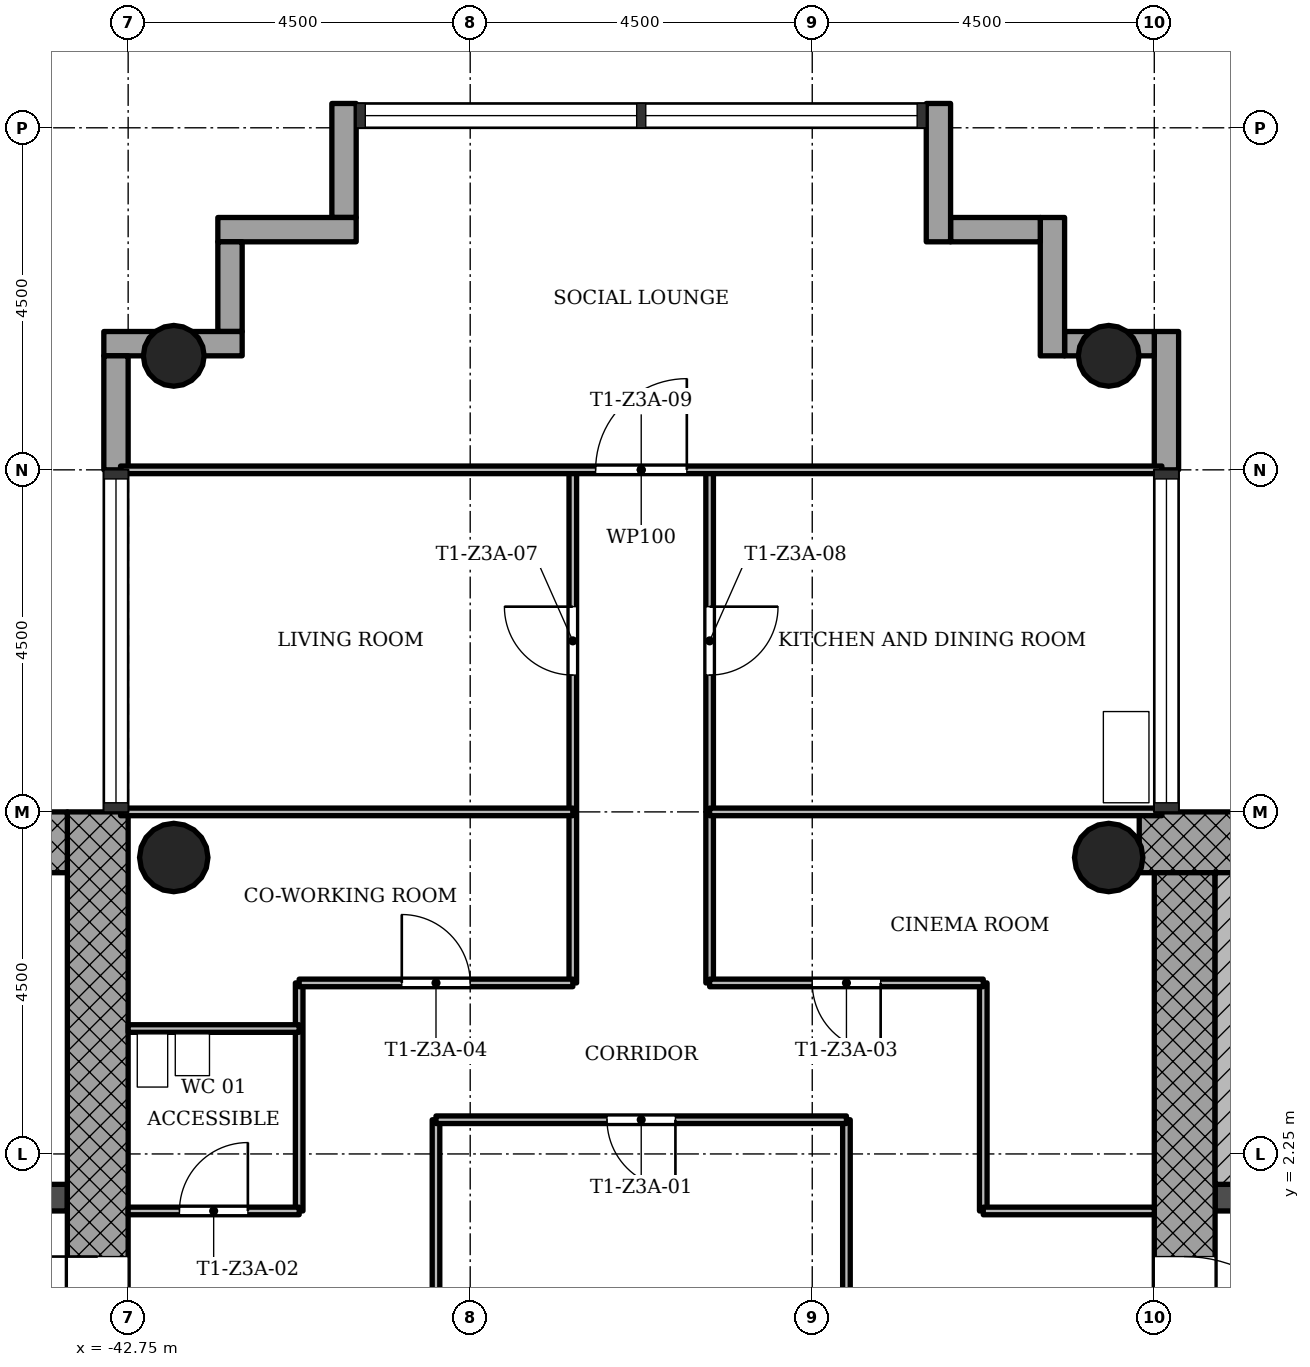
"""IFC4 building model, lengths in metres.
Left out: names, types, materials, properties, quantities, classifications, styles, units other than length and angle.
Written with IfcOpenShell. Run it as: python <this file> out.ifc"""

import sys

from ifc_helpers import new_model, si_unit, direction, frame, frame_2d, origin, origin_2d, place, context, subcontext, project, spatial, rectangle, hollow_circle, extrude, element, fill, save


model = new_model("IFC4")
c1 = context("Model", 3, precision=1e-05, world=origin(), true_north=direction((0.0, 1.0)))
c2 = subcontext(c1, "Body", "Model", "MODEL_VIEW")
j1 = project(units=[si_unit("LENGTHUNIT", "METRE"), si_unit("PLANEANGLEUNIT", "RADIAN")], contexts=[c1])
p1 = place(None, origin())
s1 = spatial("IfcSite", under=j1, at=p1, CompositionType="ELEMENT")
p2 = place(p1, origin())
s2 = spatial("IfcBuilding", under=s1, at=p2, CompositionType="ELEMENT")
p3 = place(p2, frame((0.0, 0.0, 133.7)))
s3 = spatial("IfcBuildingStorey", under=s2, at=p3, CompositionType="ELEMENT", Elevation=133.7)
p4 = place(p3, frame((-20.652, 6.35, 0.0), z_axis=(0.0, 0.0, 1.0), x_axis=(-1.0, 0.0, 0.0)))
e1 = element("IfcWall", 1, at=p4, inside=s3, PredefinedType="SHEAR", context=c2, shape_type="SweptSolid", body=[
    extrude(rectangle(XDim=8.796, YDim=0.8, at=frame_2d((4.398, 0.0))), origin(), (0.0, 0.0, 1.0), 3.4),
])
p5 = place(p3, frame((-28.85, 5.95, 0.0), z_axis=(0.0, 0.0, 1.0), x_axis=(0.0, -1.0, 0.0)))
e2 = element("IfcWall", 2, at=p5, inside=s3, PredefinedType="SHEAR", context=c2, shape_type="SweptSolid", body=[
    extrude(rectangle(XDim=12.7, YDim=0.8, at=frame_2d((6.35, 0.0))), origin(), (0.0, 0.0, 1.0), 3.4),
])
p6 = place(p5, frame((5.05, 0.0, 0.0)))
e3 = element("IfcOpeningElement", 3, at=p6, cuts=e2, PredefinedType="OPENING", context=c2, shape_type="SweptSolid", body=[
    extrude(rectangle(XDim=1.8, YDim=2.1, at=frame_2d((0.9, 1.05))), frame((0.0, 0.41, 0.0), z_axis=(0.0, -1.0, 0.0), x_axis=(1.0, 0.0, 0.0)), (0.0, 0.0, 1.0), 0.82),
])
p7 = place(p3, frame((-28.45, 1.675, 0.0), z_axis=(0.0, 0.0, 1.0), x_axis=(1.0, 0.0, 0.0)))
e4 = element("IfcWall", 4, at=p7, inside=s3, PredefinedType="SHEAR", context=c2, shape_type="SweptSolid", body=[
    extrude(rectangle(XDim=7.4, YDim=0.35, at=frame_2d((3.7, 0.0))), origin(), (0.0, 0.0, 1.0), 3.4),
])
p8 = place(p7, frame((0.85, 0.0, 0.0)))
e5 = element("IfcOpeningElement", 5, at=p8, cuts=e4, PredefinedType="OPENING", context=c2, shape_type="SweptSolid", body=[
    extrude(rectangle(XDim=0.9, YDim=2.1, at=frame_2d((0.45, 1.05))), frame((0.0, 0.185, 0.0), z_axis=(0.0, -1.0, 0.0), x_axis=(1.0, 0.0, 0.0)), (0.0, 0.0, 1.0), 0.37),
])
p9 = place(p3, frame((-43.15, -5.95, 0.0), z_axis=(0.0, 0.0, 1.0), x_axis=(0.0, 1.0, 0.0)))
e6 = element("IfcWall", 6, at=p9, inside=s3, PredefinedType="SHEAR", context=c2, shape_type="SweptSolid", body=[
    extrude(rectangle(XDim=12.7, YDim=0.8, at=frame_2d((6.35, 0.0))), origin(), (0.0, 0.0, 1.0), 3.4),
])
p10 = place(p9, frame((5.05, 0.0, 0.0)))
e7 = element("IfcOpeningElement", 7, at=p10, cuts=e6, PredefinedType="OPENING", context=c2, shape_type="SweptSolid", body=[
    extrude(rectangle(XDim=1.8, YDim=2.1, at=frame_2d((0.9, 1.05))), frame((0.0, 0.41, 0.0), z_axis=(0.0, -1.0, 0.0), x_axis=(1.0, 0.0, 0.0)), (0.0, 0.0, 1.0), 0.82),
])
p11 = place(p3, frame((-43.55, 6.35, 0.0), z_axis=(0.0, 0.0, 1.0), x_axis=(-1.0, 0.0, 0.0)))
e8 = element("IfcWall", 8, at=p11, inside=s3, PredefinedType="SHEAR", context=c2, shape_type="SweptSolid", body=[
    extrude(rectangle(XDim=8.2, YDim=0.8, at=frame_2d((4.1, 0.0))), origin(), (0.0, 0.0, 1.0), 3.4),
])
p12 = place(p3, frame((-50.95, 1.675, 0.0), z_axis=(0.0, 0.0, 1.0), x_axis=(1.0, 0.0, 0.0)))
e9 = element("IfcWall", 9, at=p12, inside=s3, PredefinedType="SHEAR", context=c2, shape_type="SweptSolid", body=[
    extrude(rectangle(XDim=7.4, YDim=0.35, at=frame_2d((3.7, 0.0))), origin(), (0.0, 0.0, 1.0), 3.4),
])
p13 = place(p12, frame((5.35, 0.0, 0.0)))
e10 = element("IfcOpeningElement", 10, at=p13, cuts=e9, PredefinedType="OPENING", context=c2, shape_type="SweptSolid", body=[
    extrude(rectangle(XDim=1.1, YDim=2.1, at=frame_2d((0.55, 1.05))), frame((0.0, 0.185, 0.0), z_axis=(0.0, -1.0, 0.0), x_axis=(1.0, 0.0, 0.0)), (0.0, 0.0, 1.0), 0.37),
])
p14 = place(p12, frame((1.0, 0.0, 0.0)))
e11 = element("IfcOpeningElement", 11, at=p14, cuts=e9, PredefinedType="OPENING", context=c2, shape_type="SweptSolid", body=[
    extrude(rectangle(XDim=1.1, YDim=2.1, at=frame_2d((0.55, 1.05))), frame((0.0, 0.185, 0.0), z_axis=(0.0, -1.0, 0.0), x_axis=(1.0, 0.0, 0.0)), (0.0, 0.0, 1.0), 0.37),
])
for number, where, z_axis, x_axis in (
    (12, (-29.85, 12.75, 0.0), (0.0, 0.0, 1.0), (1.0, 0.0, 0.0)),
    (13, (-42.15, 12.75, 0.0), (0.0, 0.0, 1.0), (1.0, 0.0, 0.0)),
):
    element("IfcColumn", number, at=place(p3, frame(where, z_axis=z_axis, x_axis=x_axis)), inside=s3, PredefinedType="COLUMN", context=c2, shape_type="SweptSolid", body=[
        extrude(hollow_circle(Radius=0.4, WallThickness=0.028, at=origin_2d()), origin(), (0.0, 0.0, 1.0), 3.4),
    ])
for number, where, z_axis, x_axis in (
    (14, (-29.85, 6.15, 0.0), (0.0, 0.0, 1.0), (1.0, 0.0, 0.0)),
    (15, (-42.15, 6.15, 0.0), (0.0, 0.0, 1.0), (1.0, 0.0, 0.0)),
):
    element("IfcColumn", number, at=place(p3, frame(where, z_axis=z_axis, x_axis=x_axis)), inside=s3, PredefinedType="COLUMN", context=c2, shape_type="SweptSolid", body=[
        extrude(hollow_circle(Radius=0.45, WallThickness=0.032, at=origin_2d()), origin(), (0.0, 0.0, 1.0), 3.4),
    ])
p15 = place(p3, frame((-29.09, 11.25, -0.3), z_axis=(0.0, 0.0, 1.0), x_axis=(0.0, 1.0, 0.0)))
e16 = element("IfcWall", 16, at=p15, inside=s3, PredefinedType="STANDARD", context=c2, shape_type="SweptSolid", body=[
    extrude(rectangle(XDim=1.82, YDim=0.32, at=frame_2d((0.91, 0.0))), origin(), (0.0, 0.0, 1.0), 3.4),
])
p16 = place(p3, frame((-29.25, 12.91, -0.3), z_axis=(0.0, 0.0, 1.0), x_axis=(-1.0, 0.0, 0.0)))
e17 = element("IfcWall", 17, at=p16, inside=s3, PredefinedType="STANDARD", context=c2, shape_type="SweptSolid", body=[
    extrude(rectangle(XDim=1.18, YDim=0.32, at=frame_2d((0.59, 0.0))), origin(), (0.0, 0.0, 1.0), 3.4),
])
p17 = place(p3, frame((-30.59, 12.75, -0.3), z_axis=(0.0, 0.0, 1.0), x_axis=(0.0, 1.0, 0.0)))
e18 = element("IfcWall", 18, at=p17, inside=s3, PredefinedType="STANDARD", context=c2, shape_type="SweptSolid", body=[
    extrude(rectangle(XDim=1.82, YDim=0.32, at=frame_2d((0.91, 0.0))), origin(), (0.0, 0.0, 1.0), 3.4),
])
p18 = place(p3, frame((-30.75, 14.41, -0.3), z_axis=(0.0, 0.0, 1.0), x_axis=(-1.0, 0.0, 0.0)))
e19 = element("IfcWall", 19, at=p18, inside=s3, PredefinedType="STANDARD", context=c2, shape_type="SweptSolid", body=[
    extrude(rectangle(XDim=1.18, YDim=0.32, at=frame_2d((0.59, 0.0))), origin(), (0.0, 0.0, 1.0), 3.4),
])
p19 = place(p3, frame((-32.09, 14.25, -0.3), z_axis=(0.0, 0.0, 1.0), x_axis=(0.0, 1.0, 0.0)))
e20 = element("IfcWall", 20, at=p19, inside=s3, PredefinedType="STANDARD", context=c2, shape_type="SweptSolid", body=[
    extrude(rectangle(XDim=1.82, YDim=0.32, at=frame_2d((0.91, 0.0))), origin(), (0.0, 0.0, 1.0), 3.4),
])
p20 = place(p3, frame((-39.91, 16.07, -0.3), z_axis=(0.0, 0.0, 1.0), x_axis=(0.0, -1.0, 0.0)))
e21 = element("IfcWall", 21, at=p20, inside=s3, PredefinedType="STANDARD", context=c2, shape_type="SweptSolid", body=[
    extrude(rectangle(XDim=1.5, YDim=0.32, at=frame_2d((0.75, 0.0))), origin(), (0.0, 0.0, 1.0), 3.4),
])
p21 = place(p3, frame((-39.75, 14.41, -0.3), z_axis=(0.0, 0.0, 1.0), x_axis=(-1.0, 0.0, 0.0)))
e22 = element("IfcWall", 22, at=p21, inside=s3, PredefinedType="STANDARD", context=c2, shape_type="SweptSolid", body=[
    extrude(rectangle(XDim=1.82, YDim=0.32, at=frame_2d((0.91, 0.0))), origin(), (0.0, 0.0, 1.0), 3.4),
])
p22 = place(p3, frame((-41.41, 14.25, -0.3), z_axis=(0.0, 0.0, 1.0), x_axis=(0.0, -1.0, 0.0)))
e23 = element("IfcWall", 23, at=p22, inside=s3, PredefinedType="STANDARD", context=c2, shape_type="SweptSolid", body=[
    extrude(rectangle(XDim=1.18, YDim=0.32, at=frame_2d((0.59, 0.0))), origin(), (0.0, 0.0, 1.0), 3.4),
])
p23 = place(p3, frame((-41.25, 12.91, -0.3), z_axis=(0.0, 0.0, 1.0), x_axis=(-1.0, 0.0, 0.0)))
e24 = element("IfcWall", 24, at=p23, inside=s3, PredefinedType="STANDARD", context=c2, shape_type="SweptSolid", body=[
    extrude(rectangle(XDim=1.82, YDim=0.32, at=frame_2d((0.91, 0.0))), origin(), (0.0, 0.0, 1.0), 3.4),
])
p24 = place(p3, frame((-42.91, 12.75, -0.3), z_axis=(0.0, 0.0, 1.0), x_axis=(0.0, -1.0, 0.0)))
e25 = element("IfcWall", 25, at=p24, inside=s3, PredefinedType="STANDARD", context=c2, shape_type="SweptSolid", body=[
    extrude(rectangle(XDim=1.5, YDim=0.32, at=frame_2d((0.75, 0.0))), origin(), (0.0, 0.0, 1.0), 3.4),
])
p25 = place(p3, frame((-40.5, 1.5, 0.0), z_axis=(0.0, 0.0, 1.0), x_axis=(0.0, 1.0, 0.0)))
e26 = element("IfcWall", 26, at=p25, inside=s3, PredefinedType="PARTITIONING", context=c2, shape_type="SweptSolid", body=[
    extrude(rectangle(XDim=3.0, YDim=0.1, at=frame_2d((1.5, 0.0))), origin(), (0.0, 0.0, 1.0), 3.0),
])
p26 = place(p3, frame((-38.7, -2.7, 0.0), z_axis=(0.0, 0.0, 1.0), x_axis=(0.0, 1.0, 0.0)))
e27 = element("IfcWall", 27, at=p26, inside=s3, PredefinedType="PARTITIONING", context=c2, shape_type="SweptSolid", body=[
    extrude(rectangle(XDim=5.4, YDim=0.1, at=frame_2d((2.7, 0.0))), origin(), (0.0, 0.0, 1.0), 3.0),
])
p27 = place(p3, frame((-36.9, 4.5, 0.0), z_axis=(0.0, 0.0, 1.0), x_axis=(0.0, 1.0, 0.0)))
e28 = element("IfcWall", 28, at=p27, inside=s3, PredefinedType="PARTITIONING", context=c2, shape_type="SweptSolid", body=[
    extrude(rectangle(XDim=6.75, YDim=0.1, at=frame_2d((3.375, 0.0))), origin(), (0.0, 0.0, 1.0), 3.0),
])
p28 = place(p27, frame((4.05, 0.0, 0.0)))
e29 = element("IfcOpeningElement", 29, at=p28, cuts=e28, PredefinedType="OPENING", context=c2, shape_type="SweptSolid", body=[
    extrude(rectangle(XDim=0.9, YDim=2.1, at=frame_2d((0.45, 1.05))), frame((0.0, 0.06, 0.0), z_axis=(0.0, -1.0, 0.0), x_axis=(1.0, 0.0, 0.0)), (0.0, 0.0, 1.0), 0.12),
])
p29 = place(p3, frame((-35.1, 4.5, 0.0), z_axis=(0.0, 0.0, 1.0), x_axis=(0.0, 1.0, 0.0)))
e30 = element("IfcWall", 30, at=p29, inside=s3, PredefinedType="PARTITIONING", context=c2, shape_type="SweptSolid", body=[
    extrude(rectangle(XDim=6.75, YDim=0.1, at=frame_2d((3.375, 0.0))), origin(), (0.0, 0.0, 1.0), 3.0),
])
p30 = place(p29, frame((4.05, 0.0, 0.0)))
e31 = element("IfcOpeningElement", 31, at=p30, cuts=e30, PredefinedType="OPENING", context=c2, shape_type="SweptSolid", body=[
    extrude(rectangle(XDim=0.9, YDim=2.1, at=frame_2d((0.45, 1.05))), frame((0.0, 0.06, 0.0), z_axis=(0.0, -1.0, 0.0), x_axis=(1.0, 0.0, 0.0)), (0.0, 0.0, 1.0), 0.12),
])
p31 = place(p3, frame((-33.3, -2.7, 0.0), z_axis=(0.0, 0.0, 1.0), x_axis=(0.0, 1.0, 0.0)))
e32 = element("IfcWall", 32, at=p31, inside=s3, PredefinedType="PARTITIONING", context=c2, shape_type="SweptSolid", body=[
    extrude(rectangle(XDim=5.4, YDim=0.1, at=frame_2d((2.7, 0.0))), origin(), (0.0, 0.0, 1.0), 3.0),
])
p32 = place(p3, frame((-31.5, 1.5, 0.0), z_axis=(0.0, 0.0, 1.0), x_axis=(0.0, 1.0, 0.0)))
e33 = element("IfcWall", 33, at=p32, inside=s3, PredefinedType="PARTITIONING", context=c2, shape_type="SweptSolid", body=[
    extrude(rectangle(XDim=3.0, YDim=0.1, at=frame_2d((1.5, 0.0))), origin(), (0.0, 0.0, 1.0), 3.0),
])
p33 = place(p3, frame((-42.75, 1.5, 0.0), z_axis=(0.0, 0.0, 1.0), x_axis=(1.0, 0.0, 0.0)))
e34 = element("IfcWall", 34, at=p33, inside=s3, PredefinedType="PARTITIONING", context=c2, shape_type="SweptSolid", body=[
    extrude(rectangle(XDim=2.25, YDim=0.1, at=frame_2d((1.125, 0.0))), origin(), (0.0, 0.0, 1.0), 3.0),
])
p34 = place(p33, frame((0.675, 0.0, 0.0)))
e35 = element("IfcOpeningElement", 35, at=p34, cuts=e34, PredefinedType="OPENING", context=c2, shape_type="SweptSolid", body=[
    extrude(rectangle(XDim=0.9, YDim=2.1, at=frame_2d((0.45, 1.05))), frame((0.0, 0.06, 0.0), z_axis=(0.0, -1.0, 0.0), x_axis=(1.0, 0.0, 0.0)), (0.0, 0.0, 1.0), 0.12),
])
p35 = place(p3, frame((-31.5, 1.5, 0.0), z_axis=(0.0, 0.0, 1.0), x_axis=(1.0, 0.0, 0.0)))
e36 = element("IfcWall", 36, at=p35, inside=s3, PredefinedType="PARTITIONING", context=c2, shape_type="SweptSolid", body=[
    extrude(rectangle(XDim=2.25, YDim=0.1, at=frame_2d((1.125, 0.0))), origin(), (0.0, 0.0, 1.0), 3.0),
])
p36 = place(p3, frame((-38.7, 2.7, 0.0), z_axis=(0.0, 0.0, 1.0), x_axis=(1.0, 0.0, 0.0)))
e37 = element("IfcWall", 37, at=p36, inside=s3, PredefinedType="PARTITIONING", context=c2, shape_type="SweptSolid", body=[
    extrude(rectangle(XDim=5.4, YDim=0.1, at=frame_2d((2.7, 0.0))), origin(), (0.0, 0.0, 1.0), 3.0),
])
p37 = place(p36, frame((2.25, 0.0, 0.0)))
e38 = element("IfcOpeningElement", 38, at=p37, cuts=e37, PredefinedType="OPENING", context=c2, shape_type="SweptSolid", body=[
    extrude(rectangle(XDim=0.9, YDim=2.1, at=frame_2d((0.45, 1.05))), frame((0.0, 0.06, 0.0), z_axis=(0.0, -1.0, 0.0), x_axis=(1.0, 0.0, 0.0)), (0.0, 0.0, 1.0), 0.12),
])
p38 = place(p3, frame((-42.75, 3.9, 0.0), z_axis=(0.0, 0.0, 1.0), x_axis=(1.0, 0.0, 0.0)))
e39 = element("IfcWall", 39, at=p38, inside=s3, PredefinedType="PARTITIONING", context=c2, shape_type="SweptSolid", body=[
    extrude(rectangle(XDim=2.25, YDim=0.1, at=frame_2d((1.125, 0.0))), origin(), (0.0, 0.0, 1.0), 3.0),
])
p39 = place(p3, frame((-40.5, 4.5, 0.0), z_axis=(0.0, 0.0, 1.0), x_axis=(1.0, 0.0, 0.0)))
e40 = element("IfcWall", 40, at=p39, inside=s3, PredefinedType="PARTITIONING", context=c2, shape_type="SweptSolid", body=[
    extrude(rectangle(XDim=3.6, YDim=0.1, at=frame_2d((1.8, 0.0))), origin(), (0.0, 0.0, 1.0), 3.0),
])
p40 = place(p39, frame((1.35, 0.0, 0.0)))
e41 = element("IfcOpeningElement", 41, at=p40, cuts=e40, PredefinedType="OPENING", context=c2, shape_type="SweptSolid", body=[
    extrude(rectangle(XDim=0.9, YDim=2.1, at=frame_2d((0.45, 1.05))), frame((0.0, 0.06, 0.0), z_axis=(0.0, -1.0, 0.0), x_axis=(1.0, 0.0, 0.0)), (0.0, 0.0, 1.0), 0.12),
])
p41 = place(p3, frame((-35.1, 4.5, 0.0), z_axis=(0.0, 0.0, 1.0), x_axis=(1.0, 0.0, 0.0)))
e42 = element("IfcWall", 42, at=p41, inside=s3, PredefinedType="PARTITIONING", context=c2, shape_type="SweptSolid", body=[
    extrude(rectangle(XDim=3.6, YDim=0.1, at=frame_2d((1.8, 0.0))), origin(), (0.0, 0.0, 1.0), 3.0),
])
p42 = place(p41, frame((1.35, 0.0, 0.0)))
e43 = element("IfcOpeningElement", 43, at=p42, cuts=e42, PredefinedType="OPENING", context=c2, shape_type="SweptSolid", body=[
    extrude(rectangle(XDim=0.9, YDim=2.1, at=frame_2d((0.45, 1.05))), frame((0.0, 0.06, 0.0), z_axis=(0.0, -1.0, 0.0), x_axis=(1.0, 0.0, 0.0)), (0.0, 0.0, 1.0), 0.12),
])
for number, where, z_axis, x_axis in (
    (44, (-42.85, 6.75, 0.0), (0.0, 0.0, 1.0), (1.0, 0.0, 0.0)),
    (45, (-35.1, 6.75, 0.0), (0.0, 0.0, 1.0), (1.0, 0.0, 0.0)),
):
    element("IfcWall", number, at=place(p3, frame(where, z_axis=z_axis, x_axis=x_axis)), inside=s3, PredefinedType="PARTITIONING", context=c2, shape_type="SweptSolid", body=[
        extrude(rectangle(XDim=5.95, YDim=0.1, at=frame_2d((2.975, 0.0))), origin(), (0.0, 0.0, 1.0), 3.0),
    ])
p43 = place(p3, frame((-42.85, 11.25, 0.0), z_axis=(0.0, 0.0, 1.0), x_axis=(1.0, 0.0, 0.0)))
e46 = element("IfcWall", 46, at=p43, inside=s3, PredefinedType="PARTITIONING", context=c2, shape_type="SweptSolid", body=[
    extrude(rectangle(XDim=13.7, YDim=0.1, at=frame_2d((6.85, 0.0))), origin(), (0.0, 0.0, 1.0), 3.0),
])
p44 = place(p43, frame((6.25, 0.0, 0.0)))
e47 = element("IfcOpeningElement", 47, at=p44, cuts=e46, PredefinedType="OPENING", context=c2, shape_type="SweptSolid", body=[
    extrude(rectangle(XDim=1.2, YDim=2.1, at=frame_2d((0.6, 1.05))), frame((0.0, 0.06, 0.0), z_axis=(0.0, -1.0, 0.0), x_axis=(1.0, 0.0, 0.0)), (0.0, 0.0, 1.0), 0.12),
])
p45 = place(p3, frame((-28.25, 1.85, 0.0), z_axis=(0.0, 0.0, 1.0), x_axis=(0.0, 1.0, 0.0)))
e48 = element("IfcWall", 48, at=p45, inside=s3, PredefinedType="SHEAR", context=c2, shape_type="SweptSolid", body=[
    extrude(rectangle(XDim=4.1, YDim=0.4, at=frame_2d((2.05, 0.0))), origin(), (0.0, 0.0, 1.0), 3.4),
])
p46 = place(p37, origin())
e49 = element("IfcDoor", 49, at=p46, inside=s3, OperationType="SINGLE_SWING_RIGHT", PredefinedType="DOOR", context=c2, shape_type="SweptSolid", body=[
    extrude(rectangle(XDim=0.9, YDim=2.1, at=frame_2d((0.45, 1.05))), frame((0.0, 0.025, 0.0), z_axis=(0.0, -1.0, 0.0), x_axis=(1.0, 0.0, 0.0)), (0.0, 0.0, 1.0), 0.05),
])
fill(e38, e49)
p47 = place(p34, origin())
e50 = element("IfcDoor", 50, at=p47, inside=s3, OperationType="SINGLE_SWING_LEFT", PredefinedType="DOOR", context=c2, shape_type="SweptSolid", body=[
    extrude(rectangle(XDim=0.9, YDim=2.1, at=frame_2d((0.45, 1.05))), frame((0.0, 0.025, 0.0), z_axis=(0.0, -1.0, 0.0), x_axis=(1.0, 0.0, 0.0)), (0.0, 0.0, 1.0), 0.05),
])
fill(e35, e50)
p48 = place(p42, origin())
e51 = element("IfcDoor", 51, at=p48, inside=s3, OperationType="SINGLE_SWING_RIGHT", PredefinedType="DOOR", context=c2, shape_type="SweptSolid", body=[
    extrude(rectangle(XDim=0.9, YDim=2.1, at=frame_2d((0.45, 1.05))), frame((0.0, 0.025, 0.0), z_axis=(0.0, -1.0, 0.0), x_axis=(1.0, 0.0, 0.0)), (0.0, 0.0, 1.0), 0.05),
])
fill(e43, e51)
p49 = place(p40, origin())
e52 = element("IfcDoor", 52, at=p49, inside=s3, OperationType="SINGLE_SWING_RIGHT", PredefinedType="DOOR", context=c2, shape_type="SweptSolid", body=[
    extrude(rectangle(XDim=0.9, YDim=2.1, at=frame_2d((0.45, 1.05))), frame((0.0, 0.025, 0.0), z_axis=(0.0, -1.0, 0.0), x_axis=(1.0, 0.0, 0.0)), (0.0, 0.0, 1.0), 0.05),
])
fill(e41, e52)
p50 = place(p28, origin())
e53 = element("IfcDoor", 53, at=p50, inside=s3, OperationType="SINGLE_SWING_LEFT", PredefinedType="DOOR", context=c2, shape_type="SweptSolid", body=[
    extrude(rectangle(XDim=0.9, YDim=2.1, at=frame_2d((0.45, 1.05))), frame((0.0, 0.025, 0.0), z_axis=(0.0, -1.0, 0.0), x_axis=(1.0, 0.0, 0.0)), (0.0, 0.0, 1.0), 0.05),
])
fill(e29, e53)
p51 = place(p30, origin())
e54 = element("IfcDoor", 54, at=p51, inside=s3, OperationType="SINGLE_SWING_RIGHT", PredefinedType="DOOR", context=c2, shape_type="SweptSolid", body=[
    extrude(rectangle(XDim=0.9, YDim=2.1, at=frame_2d((0.45, 1.05))), frame((0.0, 0.025, 0.0), z_axis=(0.0, -1.0, 0.0), x_axis=(1.0, 0.0, 0.0)), (0.0, 0.0, 1.0), 0.05),
])
fill(e31, e54)
p52 = place(p44, origin())
e55 = element("IfcDoor", 55, at=p52, inside=s3, OperationType="SINGLE_SWING_LEFT", PredefinedType="DOOR", context=c2, shape_type="SweptSolid", body=[
    extrude(rectangle(XDim=1.2, YDim=2.1, at=frame_2d((0.6, 1.05))), frame((0.0, 0.025, 0.0), z_axis=(0.0, -1.0, 0.0), x_axis=(1.0, 0.0, 0.0)), (0.0, 0.0, 1.0), 0.05),
])
fill(e47, e55)
p53 = place(p6, origin())
e56 = element("IfcDoor", 56, at=p53, inside=s3, OperationType="SINGLE_SWING_LEFT", PredefinedType="DOOR", context=c2, shape_type="SweptSolid", body=[
    extrude(rectangle(XDim=1.8, YDim=2.1, at=frame_2d((0.9, 1.05))), frame((0.0, 0.025, 0.0), z_axis=(0.0, -1.0, 0.0), x_axis=(1.0, 0.0, 0.0)), (0.0, 0.0, 1.0), 0.05),
])
fill(e3, e56)
p54 = place(p10, origin())
e57 = element("IfcDoor", 57, at=p54, inside=s3, OperationType="SINGLE_SWING_LEFT", PredefinedType="DOOR", context=c2, shape_type="SweptSolid", body=[
    extrude(rectangle(XDim=1.8, YDim=2.1, at=frame_2d((0.9, 1.05))), frame((0.0, 0.025, 0.0), z_axis=(0.0, -1.0, 0.0), x_axis=(1.0, 0.0, 0.0)), (0.0, 0.0, 1.0), 0.05),
])
fill(e7, e57)
save(model, sys.argv[1])
